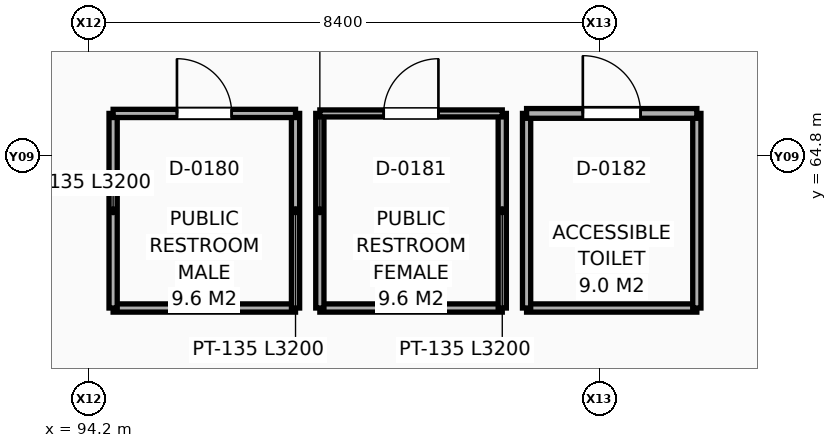
"""IFC4 building model, lengths in metres.
Left out: names, types, materials, properties, quantities, classifications, styles, units other than length and angle.
Written with IfcOpenShell. Run it as: python <this file> out.ifc"""

import sys

from ifc_helpers import new_model, si_unit, direction, frame, frame_2d, origin, place, context, subcontext, project, spatial, rectangle, extrude, element, fill, save


model = new_model("IFC4")
c1 = context("Model", 3, precision=1e-05, world=origin(), true_north=direction((0.0, 1.0)))
c2 = subcontext(c1, "Body", "Model", "MODEL_VIEW")
j1 = project(units=[si_unit("LENGTHUNIT", "METRE"), si_unit("PLANEANGLEUNIT", "RADIAN")], contexts=[c1])
p1 = place(None, origin())
s1 = spatial("IfcSite", under=j1, at=p1, CompositionType="ELEMENT")
p2 = place(p1, origin())
s2 = spatial("IfcBuilding", under=s1, at=p2, CompositionType="ELEMENT")
p3 = place(p2, frame((0.0, 0.0, 5.4)))
s3 = spatial("IfcBuildingStorey", under=s2, at=p3, CompositionType="ELEMENT", Elevation=5.4)
p4 = place(p3, frame((94.6, 62.3, 0.0), z_axis=(0.0, 0.0, 1.0), x_axis=(1.0, 0.0, 0.0)))
e1 = element("IfcWall", 1, at=p4, inside=s3, PredefinedType="PARTITIONING", context=c2, shape_type="SweptSolid", body=[
    extrude(rectangle(XDim=3.0, YDim=0.135, at=frame_2d((1.5, 0.0))), origin(), (0.0, 0.0, 1.0), 3.86),
])
for number, where, z_axis, x_axis in (
    (2, (97.6, 62.3, 0.0), (0.0, 0.0, 1.0), (0.0, 1.0, 0.0)),
    (3, (94.6, 62.3, 0.0), (0.0, 0.0, 1.0), (0.0, 1.0, 0.0)),
):
    element("IfcWall", number, at=place(p3, frame(where, z_axis=z_axis, x_axis=x_axis)), inside=s3, PredefinedType="PARTITIONING", context=c2, shape_type="SweptSolid", body=[
        extrude(rectangle(XDim=3.2, YDim=0.135, at=frame_2d((1.6, 0.0))), origin(), (0.0, 0.0, 1.0), 3.86),
    ])
p5 = place(p3, frame((94.6, 65.5, 0.0), z_axis=(0.0, 0.0, 1.0), x_axis=(1.0, 0.0, 0.0)))
e4 = element("IfcWall", 4, at=p5, inside=s3, PredefinedType="PARTITIONING", context=c2, shape_type="SweptSolid", body=[
    extrude(rectangle(XDim=3.0, YDim=0.135, at=frame_2d((1.5, 0.0))), origin(), (0.0, 0.0, 1.0), 3.86),
])
p6 = place(p5, frame((1.05, 0.0, 0.0)))
e5 = element("IfcOpeningElement", 5, at=p6, cuts=e4, PredefinedType="OPENING", context=c2, shape_type="SweptSolid", body=[
    extrude(rectangle(XDim=0.9, YDim=2.1, at=frame_2d((0.45, 1.05))), frame((0.0, 0.077, 0.0), z_axis=(0.0, -1.0, 0.0), x_axis=(1.0, 0.0, 0.0)), (0.0, 0.0, 1.0), 0.155),
])
p7 = place(p3, frame((98.0, 62.3, 0.0), z_axis=(0.0, 0.0, 1.0), x_axis=(1.0, 0.0, 0.0)))
e6 = element("IfcWall", 6, at=p7, inside=s3, PredefinedType="PARTITIONING", context=c2, shape_type="SweptSolid", body=[
    extrude(rectangle(XDim=3.0, YDim=0.135, at=frame_2d((1.5, 0.0))), origin(), (0.0, 0.0, 1.0), 3.86),
])
for number, where, z_axis, x_axis in (
    (7, (101.0, 62.3, 0.0), (0.0, 0.0, 1.0), (0.0, 1.0, 0.0)),
    (8, (98.0, 62.3, 0.0), (0.0, 0.0, 1.0), (0.0, 1.0, 0.0)),
):
    element("IfcWall", number, at=place(p3, frame(where, z_axis=z_axis, x_axis=x_axis)), inside=s3, PredefinedType="PARTITIONING", context=c2, shape_type="SweptSolid", body=[
        extrude(rectangle(XDim=3.2, YDim=0.135, at=frame_2d((1.6, 0.0))), origin(), (0.0, 0.0, 1.0), 3.86),
    ])
p8 = place(p3, frame((98.0, 65.5, 0.0), z_axis=(0.0, 0.0, 1.0), x_axis=(1.0, 0.0, 0.0)))
e9 = element("IfcWall", 9, at=p8, inside=s3, PredefinedType="PARTITIONING", context=c2, shape_type="SweptSolid", body=[
    extrude(rectangle(XDim=3.0, YDim=0.115, at=frame_2d((1.5, 0.0))), origin(), (0.0, 0.0, 1.0), 3.86),
])
p9 = place(p8, frame((1.05, 0.0, 0.0)))
e10 = element("IfcOpeningElement", 10, at=p9, cuts=e9, PredefinedType="OPENING", context=c2, shape_type="SweptSolid", body=[
    extrude(rectangle(XDim=0.9, YDim=2.1, at=frame_2d((0.45, 1.05))), frame((0.0, 0.067, 0.0), z_axis=(0.0, -1.0, 0.0), x_axis=(1.0, 0.0, 0.0)), (0.0, 0.0, 1.0), 0.135),
])
p10 = place(p3, frame((101.4, 62.3, 0.0), z_axis=(0.0, 0.0, 1.0), x_axis=(1.0, 0.0, 0.0)))
e11 = element("IfcWall", 11, at=p10, inside=s3, PredefinedType="PARTITIONING", context=c2, shape_type="SweptSolid", body=[
    extrude(rectangle(XDim=2.8, YDim=0.135, at=frame_2d((1.4, 0.0))), origin(), (0.0, 0.0, 1.0), 3.86),
])
for number, where, z_axis, x_axis in (
    (12, (104.2, 62.3, 0.0), (0.0, 0.0, 1.0), (0.0, 1.0, 0.0)),
    (13, (101.4, 62.3, 0.0), (0.0, 0.0, 1.0), (0.0, 1.0, 0.0)),
):
    element("IfcWall", number, at=place(p3, frame(where, z_axis=z_axis, x_axis=x_axis)), inside=s3, PredefinedType="PARTITIONING", context=c2, shape_type="SweptSolid", body=[
        extrude(rectangle(XDim=3.2, YDim=0.135, at=frame_2d((1.6, 0.0))), origin(), (0.0, 0.0, 1.0), 3.86),
    ])
p11 = place(p3, frame((101.4, 65.5, 0.0), z_axis=(0.0, 0.0, 1.0), x_axis=(1.0, 0.0, 0.0)))
e14 = element("IfcWall", 14, at=p11, inside=s3, PredefinedType="PARTITIONING", context=c2, shape_type="SweptSolid", body=[
    extrude(rectangle(XDim=2.8, YDim=0.16, at=frame_2d((1.4, 0.0))), origin(), (0.0, 0.0, 1.0), 3.664),
])
p12 = place(p11, frame((0.925, 0.0, 0.0)))
e15 = element("IfcOpeningElement", 15, at=p12, cuts=e14, PredefinedType="OPENING", context=c2, shape_type="SweptSolid", body=[
    extrude(rectangle(XDim=0.95, YDim=2.1, at=frame_2d((0.475, 1.05))), frame((0.0, 0.09, 0.0), z_axis=(0.0, -1.0, 0.0), x_axis=(1.0, 0.0, 0.0)), (0.0, 0.0, 1.0), 0.18),
])
p13 = place(p6, origin())
e16 = element("IfcDoor", 16, at=p13, inside=s3, OperationType="SINGLE_SWING_LEFT", PredefinedType="DOOR", context=c2, shape_type="SweptSolid", body=[
    extrude(rectangle(XDim=0.9, YDim=2.1, at=frame_2d((0.45, 1.05))), frame((0.0, 0.025, 0.0), z_axis=(0.0, -1.0, 0.0), x_axis=(1.0, 0.0, 0.0)), (0.0, 0.0, 1.0), 0.05),
])
fill(e5, e16)
p14 = place(p9, origin())
e17 = element("IfcDoor", 17, at=p14, inside=s3, OperationType="SINGLE_SWING_RIGHT", PredefinedType="DOOR", context=c2, shape_type="SweptSolid", body=[
    extrude(rectangle(XDim=0.9, YDim=2.1, at=frame_2d((0.45, 1.05))), frame((0.0, 0.025, 0.0), z_axis=(0.0, -1.0, 0.0), x_axis=(1.0, 0.0, 0.0)), (0.0, 0.0, 1.0), 0.05),
])
fill(e10, e17)
p15 = place(p12, origin())
e18 = element("IfcDoor", 18, at=p15, inside=s3, OperationType="SINGLE_SWING_LEFT", PredefinedType="DOOR", context=c2, shape_type="SweptSolid", body=[
    extrude(rectangle(XDim=0.95, YDim=2.1, at=frame_2d((0.475, 1.05))), frame((0.0, 0.025, 0.0), z_axis=(0.0, -1.0, 0.0), x_axis=(1.0, 0.0, 0.0)), (0.0, 0.0, 1.0), 0.05),
])
fill(e15, e18)
save(model, sys.argv[1])
